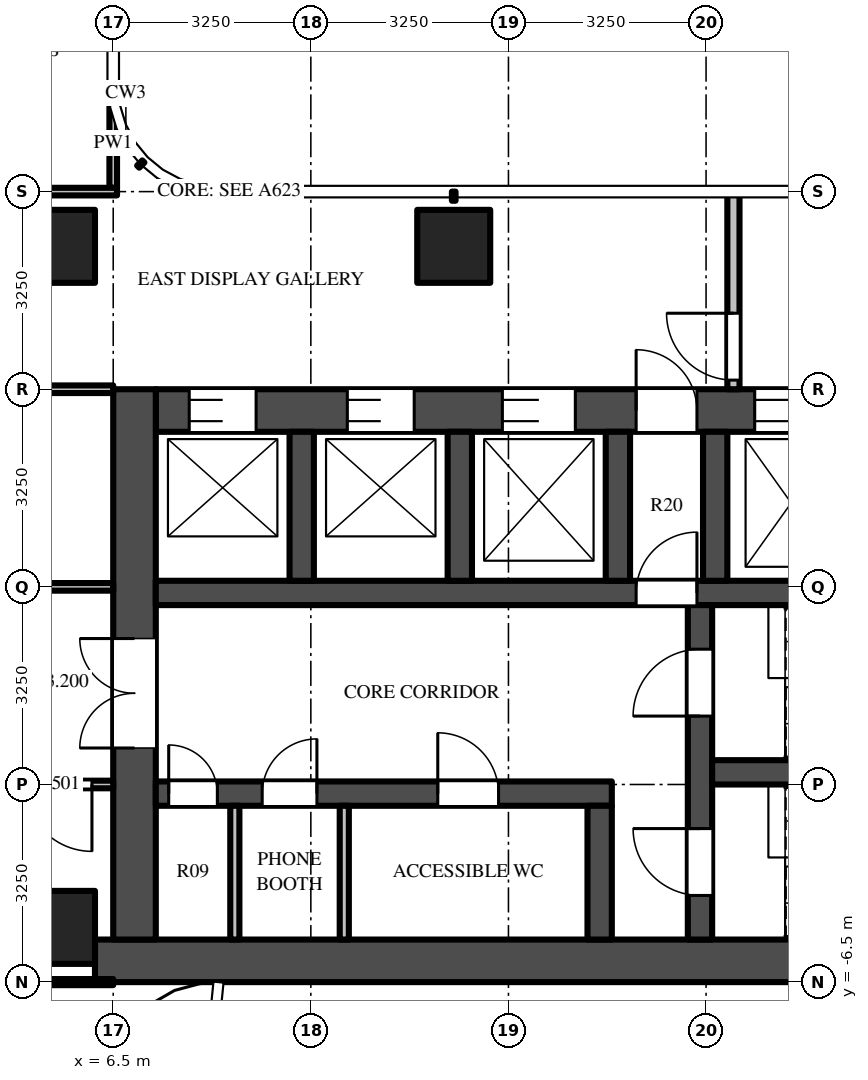
"""IFC4 building model, lengths in metres.
Left out: names, types, materials, properties, quantities, classifications, styles, units other than length and angle.
Written with IfcOpenShell. Run it as: python <this file> out.ifc"""

import sys

from ifc_helpers import new_model, si_unit, direction, frame, frame_2d, origin, origin_2d, place, context, subcontext, project, spatial, rectangle, extrude, source, transform, mapped, element, fill, save


model = new_model("IFC4")
c1 = context("Model", 3, precision=1e-05, world=origin(), true_north=direction((0.0, 1.0)))
c2 = subcontext(c1, "Body", "Model", "MODEL_VIEW")
j1 = project(units=[si_unit("LENGTHUNIT", "METRE"), si_unit("PLANEANGLEUNIT", "RADIAN")], contexts=[c1])
p1 = place(None, origin())
s1 = spatial("IfcSite", under=j1, at=p1, CompositionType="ELEMENT")
p2 = place(p1, origin())
s2 = spatial("IfcBuilding", under=s1, at=p2, CompositionType="ELEMENT")
p3 = place(p2, frame((0.0, 0.0, 193.2)))
s3 = spatial("IfcBuildingStorey", under=s2, at=p3, CompositionType="ELEMENT", Elevation=193.2)
m1 = source(origin(), c2, "Body", "SweptSolid", [
    extrude(rectangle(XDim=1.2, YDim=1.2, at=origin_2d()), origin(), (0.0, 0.0, 1.0), 3.9),
])
for number, where, z_axis, x_axis in (
    (1, (12.1, 5.6, 0.0), (0.0, 0.0, 1.0), (1.0, 0.0, 0.0)),
    (2, (5.6, 5.6, 0.0), (0.0, 0.0, 1.0), (1.0, 0.0, 0.0)),
    (3, (5.6, -5.6, 0.0), (0.0, 0.0, 1.0), (1.0, 0.0, 0.0)),
):
    element("IfcColumn", number, at=place(p3, frame(where, z_axis=z_axis, x_axis=x_axis)), inside=s3, PredefinedType="COLUMN", context=c2, shape_type="MappedRepresentation", body=[
        mapped(m1, transform((0.0, 0.0, 0.0))),
    ])
m2 = source(origin(), c2, "Body", "SweptSolid", [
    extrude(rectangle(XDim=16.55, YDim=0.7, at=frame_2d((8.275, 0.0))), origin(), (0.0, 0.0, 1.0), 3.7),
])
p4 = place(p3, frame((6.2, -6.15, 0.0), z_axis=(0.0, 0.0, 1.0), x_axis=(1.0, 0.0, 0.0)))
e4 = element("IfcWall", 4, at=p4, inside=s3, PredefinedType="SHEAR", context=c2, shape_type="MappedRepresentation", body=[
    mapped(m2, transform((0.0, 0.0, 0.0))),
])
m3 = source(origin(), c2, "Body", "SweptSolid", [
    extrude(rectangle(XDim=14.85, YDim=0.7, at=frame_2d((7.425, 0.0))), origin(), (0.0, 0.0, 1.0), 3.7),
])
p5 = place(p3, frame((7.2, 2.9, 0.0), z_axis=(0.0, 0.0, 1.0), x_axis=(1.0, 0.0, 0.0)))
e5 = element("IfcWall", 5, at=p5, inside=s3, PredefinedType="SHEAR", context=c2, shape_type="MappedRepresentation", body=[
    mapped(m3, transform((0.0, 0.0, 0.0))),
])
m4 = source(origin(), c2, "Body", "SweptSolid", [
    extrude(rectangle(XDim=1.1, YDim=2.1, at=frame_2d((0.55, 1.05))), frame((0.0, 0.36, 0.0), z_axis=(0.0, -1.0, 0.0), x_axis=(1.0, 0.0, 0.0)), (0.0, 0.0, 1.0), 0.72),
])
p6 = place(p5, frame((0.55, 0.0, 0.0)))
e6 = element("IfcOpeningElement", 6, at=p6, cuts=e5, PredefinedType="OPENING", context=c2, shape_type="MappedRepresentation", body=[
    mapped(m4, transform((0.0, 0.0, 0.0))),
])
p7 = place(p5, frame((3.15, 0.0, 0.0)))
e7 = element("IfcOpeningElement", 7, at=p7, cuts=e5, PredefinedType="OPENING", context=c2, shape_type="MappedRepresentation", body=[
    mapped(m4, transform((0.0, 0.0, 0.0))),
])
m5 = source(origin(), c2, "Body", "SweptSolid", [
    extrude(rectangle(XDim=1.2, YDim=2.1, at=frame_2d((0.6, 1.05))), frame((0.0, 0.36, 0.0), z_axis=(0.0, -1.0, 0.0), x_axis=(1.0, 0.0, 0.0)), (0.0, 0.0, 1.0), 0.72),
])
p8 = place(p5, frame((5.7, 0.0, 0.0)))
e8 = element("IfcOpeningElement", 8, at=p8, cuts=e5, PredefinedType="OPENING", context=c2, shape_type="MappedRepresentation", body=[
    mapped(m5, transform((0.0, 0.0, 0.0))),
])
m6 = source(origin(), c2, "Body", "SweptSolid", [
    extrude(rectangle(XDim=1.3, YDim=2.1, at=frame_2d((0.65, 1.05))), frame((0.0, 0.36, 0.0), z_axis=(0.0, -1.0, 0.0), x_axis=(1.0, 0.0, 0.0)), (0.0, 0.0, 1.0), 0.72),
])
p9 = place(p5, frame((12.2, 0.0, 0.0)))
e9 = element("IfcOpeningElement", 9, at=p9, cuts=e5, PredefinedType="OPENING", context=c2, shape_type="MappedRepresentation", body=[
    mapped(m6, transform((0.0, 0.0, 0.0))),
])
p10 = place(p5, frame((9.85, 0.0, 0.0)))
e10 = element("IfcOpeningElement", 10, at=p10, cuts=e5, PredefinedType="OPENING", context=c2, shape_type="MappedRepresentation", body=[
    mapped(m5, transform((0.0, 0.0, 0.0))),
])
m7 = source(origin(), c2, "Body", "SweptSolid", [
    extrude(rectangle(XDim=1.0, YDim=2.1, at=frame_2d((0.5, 1.05))), frame((0.0, 0.36, 0.0), z_axis=(0.0, -1.0, 0.0), x_axis=(1.0, 0.0, 0.0)), (0.0, 0.0, 1.0), 0.72),
])
p11 = place(p5, frame((7.9, 0.0, 0.0)))
e11 = element("IfcOpeningElement", 11, at=p11, cuts=e5, PredefinedType="OPENING", context=c2, shape_type="MappedRepresentation", body=[
    mapped(m7, transform((0.0, 0.0, 0.0))),
])
m8 = source(origin(), c2, "Body", "SweptSolid", [
    extrude(rectangle(XDim=9.05, YDim=0.7, at=frame_2d((4.525, 0.0))), origin(), (0.0, 0.0, 1.0), 3.7),
])
p12 = place(p3, frame((6.85, -5.8, 0.0), z_axis=(0.0, 0.0, 1.0), x_axis=(0.0, 1.0, 0.0)))
e12 = element("IfcWall", 12, at=p12, inside=s3, PredefinedType="SHEAR", context=c2, shape_type="MappedRepresentation", body=[
    mapped(m8, transform((0.0, 0.0, 0.0))),
])
m9 = source(origin(), c2, "Body", "SweptSolid", [
    extrude(rectangle(XDim=1.8, YDim=2.1, at=frame_2d((0.9, 1.05))), frame((0.0, 0.36, 0.0), z_axis=(0.0, -1.0, 0.0), x_axis=(1.0, 0.0, 0.0)), (0.0, 0.0, 1.0), 0.72),
])
p13 = place(p12, frame((3.15, 0.0, 0.0)))
e13 = element("IfcOpeningElement", 13, at=p13, cuts=e12, PredefinedType="OPENING", context=c2, shape_type="MappedRepresentation", body=[
    mapped(m9, transform((0.0, 0.0, 0.0))),
])
m10 = source(origin(), c2, "Body", "SweptSolid", [
    extrude(rectangle(XDim=7.5, YDim=0.4, at=frame_2d((3.75, 0.0))), origin(), (0.0, 0.0, 1.0), 3.7),
])
p14 = place(p3, frame((7.2, -3.4, 0.0), z_axis=(0.0, 0.0, 1.0), x_axis=(1.0, 0.0, 0.0)))
e14 = element("IfcWall", 14, at=p14, inside=s3, PredefinedType="SHEAR", context=c2, shape_type="MappedRepresentation", body=[
    mapped(m10, transform((0.0, 0.0, 0.0))),
])
m11 = source(origin(), c2, "Body", "SweptSolid", [
    extrude(rectangle(XDim=0.8, YDim=2.1, at=frame_2d((0.4, 1.05))), frame((0.0, 0.21, 0.0), z_axis=(0.0, -1.0, 0.0), x_axis=(1.0, 0.0, 0.0)), (0.0, 0.0, 1.0), 0.42),
])
p15 = place(p14, frame((0.212, 0.0, 0.0)))
e15 = element("IfcOpeningElement", 15, at=p15, cuts=e14, PredefinedType="OPENING", context=c2, shape_type="MappedRepresentation", body=[
    mapped(m11, transform((0.0, 0.0, 0.0))),
])
m12 = source(origin(), c2, "Body", "SweptSolid", [
    extrude(rectangle(XDim=0.9, YDim=2.1, at=frame_2d((0.45, 1.05))), frame((0.0, 0.21, 0.0), z_axis=(0.0, -1.0, 0.0), x_axis=(1.0, 0.0, 0.0)), (0.0, 0.0, 1.0), 0.42),
])
p16 = place(p14, frame((1.75, 0.0, 0.0)))
e16 = element("IfcOpeningElement", 16, at=p16, cuts=e14, PredefinedType="OPENING", context=c2, shape_type="MappedRepresentation", body=[
    mapped(m12, transform((0.0, 0.0, 0.0))),
])
m13 = source(origin(), c2, "Body", "SweptSolid", [
    extrude(rectangle(XDim=1.0, YDim=2.1, at=frame_2d((0.5, 1.05))), frame((0.0, 0.21, 0.0), z_axis=(0.0, -1.0, 0.0), x_axis=(1.0, 0.0, 0.0)), (0.0, 0.0, 1.0), 0.42),
])
p17 = place(p14, frame((4.637, 0.0, 0.0)))
e17 = element("IfcOpeningElement", 17, at=p17, cuts=e14, PredefinedType="OPENING", context=c2, shape_type="MappedRepresentation", body=[
    mapped(m13, transform((0.0, 0.0, 0.0))),
])
m14 = source(origin(), c2, "Body", "SweptSolid", [
    extrude(rectangle(XDim=14.85, YDim=0.4, at=frame_2d((7.425, 0.0))), origin(), (0.0, 0.0, 1.0), 3.7),
])
p18 = place(p3, frame((7.2, -0.1, 0.0), z_axis=(0.0, 0.0, 1.0), x_axis=(1.0, 0.0, 0.0)))
e18 = element("IfcWall", 18, at=p18, inside=s3, PredefinedType="SHEAR", context=c2, shape_type="MappedRepresentation", body=[
    mapped(m14, transform((0.0, 0.0, 0.0))),
])
p19 = place(p18, frame((7.9, 0.0, 0.0)))
e19 = element("IfcOpeningElement", 19, at=p19, cuts=e18, PredefinedType="OPENING", context=c2, shape_type="MappedRepresentation", body=[
    mapped(m13, transform((0.0, 0.0, 0.0))),
])
m15 = source(origin(), c2, "Body", "SweptSolid", [
    extrude(rectangle(XDim=5.5, YDim=0.4, at=frame_2d((2.75, 0.0))), origin(), (0.0, 0.0, 1.0), 3.7),
])
p20 = place(p3, frame((16.15, -5.8, 0.0), z_axis=(0.0, 0.0, 1.0), x_axis=(0.0, 1.0, 0.0)))
e20 = element("IfcWall", 20, at=p20, inside=s3, PredefinedType="SHEAR", context=c2, shape_type="MappedRepresentation", body=[
    mapped(m15, transform((0.0, 0.0, 0.0))),
])
m16 = source(origin(), c2, "Body", "SweptSolid", [
    extrude(rectangle(XDim=1.1, YDim=2.1, at=frame_2d((0.55, 1.05))), frame((0.0, 0.21, 0.0), z_axis=(0.0, -1.0, 0.0), x_axis=(1.0, 0.0, 0.0)), (0.0, 0.0, 1.0), 0.42),
])
p21 = place(p20, frame((0.725, 0.0, 0.0)))
e21 = element("IfcOpeningElement", 21, at=p21, cuts=e20, PredefinedType="OPENING", context=c2, shape_type="MappedRepresentation", body=[
    mapped(m16, transform((0.0, 0.0, 0.0))),
])
p22 = place(p20, frame((3.675, 0.0, 0.0)))
e22 = element("IfcOpeningElement", 22, at=p22, cuts=e20, PredefinedType="OPENING", context=c2, shape_type="MappedRepresentation", body=[
    mapped(m16, transform((0.0, 0.0, 0.0))),
])
m17 = source(origin(), c2, "Body", "SweptSolid", [
    extrude(rectangle(XDim=5.7, YDim=0.4, at=frame_2d((2.85, 0.0))), origin(), (0.0, 0.0, 1.0), 3.7),
])
p23 = place(p3, frame((16.35, -3.05, 0.0), z_axis=(0.0, 0.0, 1.0), x_axis=(1.0, 0.0, 0.0)))
e23 = element("IfcWall", 23, at=p23, inside=s3, PredefinedType="SHEAR", context=c2, shape_type="MappedRepresentation", body=[
    mapped(m17, transform((0.0, 0.0, 0.0))),
])
m18 = source(origin(), c2, "Body", "SweptSolid", [
    extrude(rectangle(XDim=2.2, YDim=0.4, at=frame_2d((1.1, 0.0))), origin(), (0.0, 0.0, 1.0), 3.7),
])
p24 = place(p3, frame((14.5, -5.8, 0.0), z_axis=(0.0, 0.0, 1.0), x_axis=(0.0, 1.0, 0.0)))
e24 = element("IfcWall", 24, at=p24, inside=s3, PredefinedType="SHEAR", context=c2, shape_type="MappedRepresentation", body=[
    mapped(m18, transform((0.0, 0.0, 0.0))),
])
m19 = source(origin(), c2, "Body", "SweptSolid", [
    extrude(rectangle(XDim=2.45, YDim=0.4, at=frame_2d((1.225, 0.0))), origin(), (0.0, 0.0, 1.0), 3.7),
])
for number, where, z_axis, x_axis in (
    (25, (9.6, 0.1, 0.0), (0.0, 0.0, 1.0), (0.0, 1.0, 0.0)),
    (26, (12.2, 0.1, 0.0), (0.0, 0.0, 1.0), (0.0, 1.0, 0.0)),
    (27, (14.8, 0.1, 0.0), (0.0, 0.0, 1.0), (0.0, 1.0, 0.0)),
    (28, (16.4, 0.1, 0.0), (0.0, 0.0, 1.0), (0.0, 1.0, 0.0)),
):
    element("IfcWall", number, at=place(p3, frame(where, z_axis=z_axis, x_axis=x_axis)), inside=s3, PredefinedType="SHEAR", context=c2, shape_type="MappedRepresentation", body=[
        mapped(m19, transform((0.0, 0.0, 0.0))),
    ])
m20 = source(origin(), c2, "Body", "SweptSolid", [
    extrude(rectangle(XDim=3.25, YDim=0.2, at=frame_2d((1.625, 0.0))), origin(), (0.0, 0.0, 1.0), 3.7),
])
p25 = place(p3, frame((16.7, 3.25, 0.0), z_axis=(0.0, 0.0, 1.0), x_axis=(0.0, 1.0, 0.0)))
e29 = element("IfcWall", 29, at=p25, inside=s3, PredefinedType="PARTITIONING", context=c2, shape_type="MappedRepresentation", body=[
    mapped(m20, transform((0.0, 0.0, 0.0))),
])
m21 = source(origin(), c2, "Body", "SweptSolid", [
    extrude(rectangle(XDim=1.1, YDim=2.1, at=frame_2d((0.55, 1.05))), frame((0.0, 0.11, 0.0), z_axis=(0.0, -1.0, 0.0), x_axis=(1.0, 0.0, 0.0)), (0.0, 0.0, 1.0), 0.22),
])
p26 = place(p25, frame((0.15, 0.0, 0.0)))
e30 = element("IfcOpeningElement", 30, at=p26, cuts=e29, PredefinedType="OPENING", context=c2, shape_type="MappedRepresentation", body=[
    mapped(m21, transform((0.0, 0.0, 0.0))),
])
m22 = source(origin(), c2, "Body", "SweptSolid", [
    extrude(rectangle(XDim=2.2, YDim=0.15, at=frame_2d((1.1, 0.0))), origin(), (0.0, 0.0, 1.0), 3.7),
])
for number, where, z_axis, x_axis in (
    (31, (8.5, -5.8, 0.0), (0.0, 0.0, 1.0), (0.0, 1.0, 0.0)),
    (32, (10.3, -5.8, 0.0), (0.0, 0.0, 1.0), (0.0, 1.0, 0.0)),
):
    element("IfcWall", number, at=place(p3, frame(where, z_axis=z_axis, x_axis=x_axis)), inside=s3, PredefinedType="PARTITIONING", context=c2, shape_type="MappedRepresentation", body=[
        mapped(m22, transform((0.0, 0.0, 0.0))),
    ])
m23 = source(origin(), c2, "Body", "SweptSolid", [
    extrude(rectangle(XDim=1.469, YDim=0.125, at=frame_2d((0.734, 0.0))), origin(), (0.0, 0.0, 1.0), 3.7),
])
p27 = place(p3, frame((6.5, 6.562, 0.0), z_axis=(0.0, 0.0, 1.0), x_axis=(0.0, 1.0, 0.0)))
e33 = element("IfcWall", 33, at=p27, inside=s3, PredefinedType="PARTITIONING", context=c2, shape_type="MappedRepresentation", body=[
    mapped(m23, transform((0.0, 0.0, 0.0))),
])
m24 = source(origin(), c2, "Body", "SweptSolid", [
    extrude(rectangle(XDim=5.363, YDim=0.1, at=frame_2d((2.681, 0.0))), origin(), (0.0, 0.0, 1.0), 2.78),
])
p28 = place(p3, frame((1.137, -6.5, 0.0), z_axis=(0.0, 0.0, 1.0), x_axis=(1.0, 0.0, 0.0)))
e34 = element("IfcWall", 34, at=p28, inside=s3, PredefinedType="PARTITIONING", context=c2, shape_type="MappedRepresentation", body=[
    mapped(m24, transform((0.0, 0.0, 0.0))),
])
m25 = source(origin(), c2, "Body", "SweptSolid", [
    extrude(rectangle(XDim=5.363, YDim=0.125, at=frame_2d((2.681, 0.0))), origin(), (0.0, 0.0, 1.0), 2.997),
])
p29 = place(p3, frame((6.5, -3.25, 0.0), z_axis=(0.0, 0.0, 1.0), x_axis=(-1.0, 0.0, 0.0)))
e35 = element("IfcWall", 35, at=p29, inside=s3, PredefinedType="PARTITIONING", context=c2, shape_type="MappedRepresentation", body=[
    mapped(m25, transform((0.0, 0.0, 0.0))),
])
m26 = source(origin(), c2, "Body", "SweptSolid", [
    extrude(rectangle(XDim=1.1, YDim=2.1, at=frame_2d((0.55, 1.05))), frame((0.0, 0.073, 0.0), z_axis=(0.0, -1.0, 0.0), x_axis=(1.0, 0.0, 0.0)), (0.0, 0.0, 1.0), 0.145),
])
p30 = place(p29, frame((0.35, 0.0, 0.0)))
e36 = element("IfcOpeningElement", 36, at=p30, cuts=e35, PredefinedType="OPENING", context=c2, shape_type="MappedRepresentation", body=[
    mapped(m26, transform((0.0, 0.0, 0.0))),
])
p31 = place(p3, frame((6.5, 0.0, 0.0), z_axis=(0.0, 0.0, 1.0), x_axis=(-1.0, 0.0, 0.0)))
e37 = element("IfcWall", 37, at=p31, inside=s3, PredefinedType="PARTITIONING", context=c2, shape_type="MappedRepresentation", body=[
    mapped(m25, transform((0.0, 0.0, 0.0))),
])
m27 = source(origin(), c2, "Body", "SweptSolid", [
    extrude(rectangle(XDim=1.0, YDim=2.1, at=frame_2d((0.5, 1.05))), frame((0.0, 0.073, 0.0), z_axis=(0.0, -1.0, 0.0), x_axis=(1.0, 0.0, 0.0)), (0.0, 0.0, 1.0), 0.145),
])
p32 = place(p31, frame((3.95, 0.0, 0.0)))
e38 = element("IfcOpeningElement", 38, at=p32, cuts=e37, PredefinedType="OPENING", context=c2, shape_type="MappedRepresentation", body=[
    mapped(m27, transform((0.0, 0.0, 0.0))),
])
p33 = place(p3, frame((1.137, 3.25, 0.0), z_axis=(0.0, 0.0, 1.0), x_axis=(1.0, 0.0, 0.0)))
e39 = element("IfcWall", 39, at=p33, inside=s3, PredefinedType="PARTITIONING", context=c2, shape_type="MappedRepresentation", body=[
    mapped(m25, transform((0.0, 0.0, 0.0))),
])
m28 = source(origin(), c2, "Body", "SweptSolid", [
    extrude(rectangle(XDim=3.725, YDim=0.125, at=frame_2d((1.863, 0.0))), origin(), (0.0, 0.0, 1.0), 2.78),
])
p34 = place(p3, frame((2.837, 6.5, 0.0), z_axis=(0.0, 0.0, 1.0), x_axis=(1.0, 0.0, 0.0)))
e40 = element("IfcWall", 40, at=p34, inside=s3, PredefinedType="PARTITIONING", context=c2, shape_type="MappedRepresentation", body=[
    mapped(m28, transform((0.0, 0.0, 0.0))),
])
m29 = source(origin(), c2, "Body", "SweptSolid", [
    extrude(rectangle(XDim=1.1, YDim=2.1, at=frame_2d((0.55, 1.05))), frame((0.0, -0.275, 0.0), z_axis=(0.0, -1.0, 0.0), x_axis=(1.0, 0.0, 0.0)), (0.0, 0.0, 1.0), 0.05),
])
p35 = place(p6, origin())
e41 = element("IfcDoor", 41, at=p35, inside=s3, OperationType="DOUBLE_DOOR_SLIDING", PredefinedType="DOOR", context=c2, shape_type="MappedRepresentation", body=[
    mapped(m29, transform((0.0, 0.0, 0.0))),
])
fill(e6, e41)
p36 = place(p7, origin())
e42 = element("IfcDoor", 42, at=p36, inside=s3, OperationType="DOUBLE_DOOR_SLIDING", PredefinedType="DOOR", context=c2, shape_type="MappedRepresentation", body=[
    mapped(m29, transform((0.0, 0.0, 0.0))),
])
fill(e7, e42)
m30 = source(origin(), c2, "Body", "SweptSolid", [
    extrude(rectangle(XDim=1.2, YDim=2.1, at=frame_2d((0.6, 1.05))), frame((0.0, -0.275, 0.0), z_axis=(0.0, -1.0, 0.0), x_axis=(1.0, 0.0, 0.0)), (0.0, 0.0, 1.0), 0.05),
])
p37 = place(p8, origin())
e43 = element("IfcDoor", 43, at=p37, inside=s3, OperationType="DOUBLE_DOOR_SLIDING", PredefinedType="DOOR", context=c2, shape_type="MappedRepresentation", body=[
    mapped(m30, transform((0.0, 0.0, 0.0))),
])
fill(e8, e43)
p38 = place(p10, origin())
e44 = element("IfcDoor", 44, at=p38, inside=s3, OperationType="DOUBLE_DOOR_SLIDING", PredefinedType="DOOR", context=c2, shape_type="MappedRepresentation", body=[
    mapped(m30, transform((0.0, 0.0, 0.0))),
])
fill(e10, e44)
m31 = source(origin(), c2, "Body", "SweptSolid", [
    extrude(rectangle(XDim=1.8, YDim=2.1, at=frame_2d((0.9, 1.05))), frame((0.0, -0.275, 0.0), z_axis=(0.0, -1.0, 0.0), x_axis=(1.0, 0.0, 0.0)), (0.0, 0.0, 1.0), 0.05),
])
p39 = place(p13, origin())
e45 = element("IfcDoor", 45, at=p39, inside=s3, OperationType="DOUBLE_DOOR_SINGLE_SWING", PredefinedType="DOOR", context=c2, shape_type="MappedRepresentation", body=[
    mapped(m31, transform((0.0, 0.0, 0.0))),
])
fill(e13, e45)
m32 = source(origin(), c2, "Body", "SweptSolid", [
    extrude(rectangle(XDim=1.1, YDim=2.1, at=frame_2d((0.55, 1.05))), frame((0.0, 0.025, 0.0), z_axis=(0.0, -1.0, 0.0), x_axis=(1.0, 0.0, 0.0)), (0.0, 0.0, 1.0), 0.05),
])
p40 = place(p21, origin())
e46 = element("IfcDoor", 46, at=p40, inside=s3, OperationType="SINGLE_SWING_RIGHT", PredefinedType="DOOR", context=c2, shape_type="MappedRepresentation", body=[
    mapped(m32, transform((0.0, 0.0, 0.0))),
])
fill(e21, e46)
p41 = place(p22, origin())
e47 = element("IfcDoor", 47, at=p41, inside=s3, OperationType="SINGLE_SWING_LEFT", PredefinedType="DOOR", context=c2, shape_type="MappedRepresentation", body=[
    mapped(m32, transform((0.0, 0.0, 0.0))),
])
fill(e22, e47)
m33 = source(origin(), c2, "Body", "SweptSolid", [
    extrude(rectangle(XDim=1.0, YDim=2.1, at=frame_2d((0.5, 1.05))), frame((0.0, 0.025, 0.0), z_axis=(0.0, -1.0, 0.0), x_axis=(1.0, 0.0, 0.0)), (0.0, 0.0, 1.0), 0.05),
])
p42 = place(p19, origin())
e48 = element("IfcDoor", 48, at=p42, inside=s3, OperationType="SINGLE_SWING_RIGHT", PredefinedType="DOOR", context=c2, shape_type="MappedRepresentation", body=[
    mapped(m33, transform((0.0, 0.0, 0.0))),
])
fill(e19, e48)
m34 = source(origin(), c2, "Body", "SweptSolid", [
    extrude(rectangle(XDim=1.0, YDim=2.1, at=frame_2d((0.5, 1.05))), frame((0.0, -0.275, 0.0), z_axis=(0.0, -1.0, 0.0), x_axis=(1.0, 0.0, 0.0)), (0.0, 0.0, 1.0), 0.05),
])
p43 = place(p11, origin())
e49 = element("IfcDoor", 49, at=p43, inside=s3, OperationType="SINGLE_SWING_LEFT", PredefinedType="DOOR", context=c2, shape_type="MappedRepresentation", body=[
    mapped(m34, transform((0.0, 0.0, 0.0))),
])
fill(e11, e49)
p44 = place(p26, origin())
e50 = element("IfcDoor", 50, at=p44, inside=s3, OperationType="SINGLE_SWING_RIGHT", PredefinedType="DOOR", context=c2, shape_type="MappedRepresentation", body=[
    mapped(m32, transform((0.0, 0.0, 0.0))),
])
fill(e30, e50)
m35 = source(origin(), c2, "Body", "SweptSolid", [
    extrude(rectangle(XDim=0.8, YDim=2.1, at=frame_2d((0.4, 1.05))), frame((0.0, 0.025, 0.0), z_axis=(0.0, -1.0, 0.0), x_axis=(1.0, 0.0, 0.0)), (0.0, 0.0, 1.0), 0.05),
])
p45 = place(p15, origin())
e51 = element("IfcDoor", 51, at=p45, inside=s3, OperationType="SINGLE_SWING_LEFT", PredefinedType="DOOR", context=c2, shape_type="MappedRepresentation", body=[
    mapped(m35, transform((0.0, 0.0, 0.0))),
])
fill(e15, e51)
m36 = source(origin(), c2, "Body", "SweptSolid", [
    extrude(rectangle(XDim=0.9, YDim=2.1, at=frame_2d((0.45, 1.05))), frame((0.0, 0.025, 0.0), z_axis=(0.0, -1.0, 0.0), x_axis=(1.0, 0.0, 0.0)), (0.0, 0.0, 1.0), 0.05),
])
p46 = place(p16, origin())
e52 = element("IfcDoor", 52, at=p46, inside=s3, OperationType="SINGLE_SWING_RIGHT", PredefinedType="DOOR", context=c2, shape_type="MappedRepresentation", body=[
    mapped(m36, transform((0.0, 0.0, 0.0))),
])
fill(e16, e52)
p47 = place(p17, origin())
e53 = element("IfcDoor", 53, at=p47, inside=s3, OperationType="SINGLE_SWING_LEFT", PredefinedType="DOOR", context=c2, shape_type="MappedRepresentation", body=[
    mapped(m33, transform((0.0, 0.0, 0.0))),
])
fill(e17, e53)
p48 = place(p30, origin())
e54 = element("IfcDoor", 54, at=p48, inside=s3, OperationType="SINGLE_SWING_LEFT", PredefinedType="DOOR", context=c2, shape_type="MappedRepresentation", body=[
    mapped(m32, transform((0.0, 0.0, 0.0))),
])
fill(e36, e54)
save(model, sys.argv[1])
